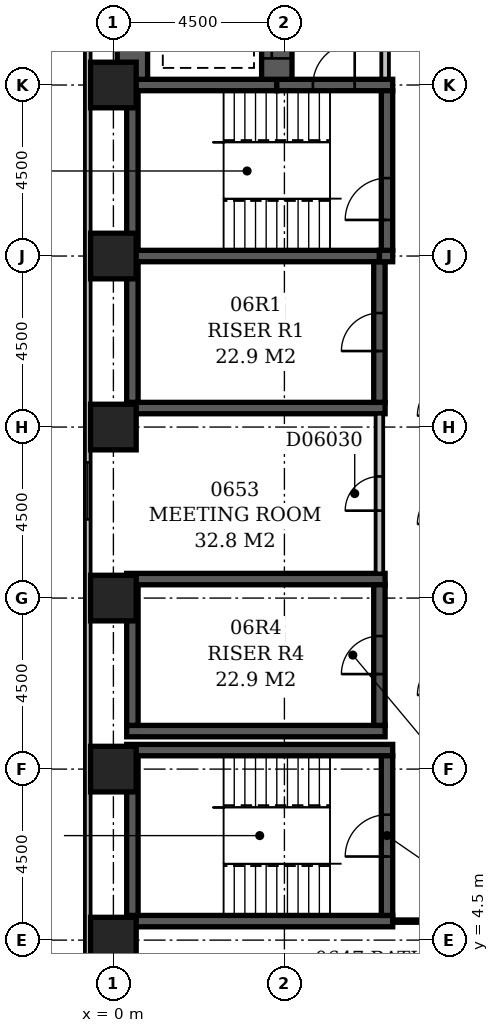
"""IFC4 building model, lengths in metres.
Left out: names, types, materials, properties, quantities, classifications, styles, units other than length and angle.
Written with IfcOpenShell. Run it as: python <this file> out.ifc"""

import sys

from ifc_helpers import new_model, si_unit, direction, frame, frame_2d, origin, origin_2d, place, context, subcontext, project, spatial, rectangle, extrude, element, fill, save


model = new_model("IFC4")
c1 = context("Model", 3, precision=1e-05, world=origin(), true_north=direction((0.0, 1.0)))
c2 = subcontext(c1, "Body", "Model", "MODEL_VIEW")
j1 = project(units=[si_unit("LENGTHUNIT", "METRE"), si_unit("PLANEANGLEUNIT", "RADIAN")], contexts=[c1])
p1 = place(None, origin())
s1 = spatial("IfcSite", under=j1, at=p1, CompositionType="ELEMENT")
p2 = place(p1, origin())
s2 = spatial("IfcBuilding", under=s1, at=p2, CompositionType="ELEMENT")
p3 = place(p2, frame((0.0, 0.0, 32.6)))
s3 = spatial("IfcBuildingStorey", under=s2, at=p3, CompositionType="ELEMENT", Elevation=32.6)
for number, where, z_axis, x_axis in (
    (1, (0.35, 5.0, -0.3), (0.0, 0.0, 1.0), (1.0, 0.0, 0.0)),
    (2, (0.35, 9.5, -0.3), (0.0, 0.0, 1.0), (1.0, 0.0, 0.0)),
):
    element("IfcWall", number, at=place(p3, frame(where, z_axis=z_axis, x_axis=x_axis)), inside=s3, PredefinedType="SHEAR", context=c2, shape_type="SweptSolid", body=[
        extrude(rectangle(XDim=7.0, YDim=0.3, at=frame_2d((3.5, 0.0))), origin(), (0.0, 0.0, 1.0), 3.6),
    ])
for number, where, z_axis, x_axis in (
    (3, (0.35, 10.0, -0.3), (0.0, 0.0, 1.0), (1.0, 0.0, 0.0)),
    (4, (0.35, 14.0, -0.3), (0.0, 0.0, 1.0), (1.0, 0.0, 0.0)),
    (5, (0.35, 18.5, -0.3), (0.0, 0.0, 1.0), (1.0, 0.0, 0.0)),
):
    element("IfcWall", number, at=place(p3, frame(where, z_axis=z_axis, x_axis=x_axis)), inside=s3, PredefinedType="SHEAR", context=c2, shape_type="SweptSolid", body=[
        extrude(rectangle(XDim=6.8, YDim=0.3, at=frame_2d((3.4, 0.0))), origin(), (0.0, 0.0, 1.0), 3.6),
    ])
p4 = place(p3, frame((0.35, 22.5, -0.3), z_axis=(0.0, 0.0, 1.0), x_axis=(1.0, 0.0, 0.0)))
e6 = element("IfcWall", 6, at=p4, inside=s3, PredefinedType="SHEAR", context=c2, shape_type="SweptSolid", body=[
    extrude(rectangle(XDim=6.65, YDim=0.3, at=frame_2d((3.325, 0.0))), origin(), (0.0, 0.0, 1.0), 3.6),
])
p5 = place(p3, frame((0.35, 27.0, -0.3), z_axis=(0.0, 0.0, 1.0), x_axis=(1.0, 0.0, 0.0)))
e7 = element("IfcWall", 7, at=p5, inside=s3, PredefinedType="SHEAR", context=c2, shape_type="SweptSolid", body=[
    extrude(rectangle(XDim=3.95, YDim=0.3, at=frame_2d((1.975, 0.0))), origin(), (0.0, 0.0, 1.0), 3.6),
])
p6 = place(p3, frame((0.5, 5.15, -0.3), z_axis=(0.0, 0.0, 1.0), x_axis=(0.0, 1.0, 0.0)))
e8 = element("IfcWall", 8, at=p6, inside=s3, PredefinedType="SHEAR", context=c2, shape_type="SweptSolid", body=[
    extrude(rectangle(XDim=4.2, YDim=0.3, at=frame_2d((2.1, 0.0))), origin(), (0.0, 0.0, 1.0), 3.6),
])
for number, where, z_axis, x_axis in (
    (9, (0.5, 10.15, -0.3), (0.0, 0.0, 1.0), (0.0, 1.0, 0.0)),
    (10, (0.5, 18.65, -0.3), (0.0, 0.0, 1.0), (0.0, 1.0, 0.0)),
):
    element("IfcWall", number, at=place(p3, frame(where, z_axis=z_axis, x_axis=x_axis)), inside=s3, PredefinedType="SHEAR", context=c2, shape_type="SweptSolid", body=[
        extrude(rectangle(XDim=3.7, YDim=0.3, at=frame_2d((1.85, 0.0))), origin(), (0.0, 0.0, 1.0), 3.6),
    ])
p7 = place(p3, frame((0.5, 22.65, -0.3), z_axis=(0.0, 0.0, 1.0), x_axis=(0.0, 1.0, 0.0)))
e11 = element("IfcWall", 11, at=p7, inside=s3, PredefinedType="SHEAR", context=c2, shape_type="SweptSolid", body=[
    extrude(rectangle(XDim=4.2, YDim=0.3, at=frame_2d((2.1, 0.0))), origin(), (0.0, 0.0, 1.0), 3.6),
])
p8 = place(p3, frame((0.5, 27.15, -0.3), z_axis=(0.0, 0.0, 1.0), x_axis=(0.0, 1.0, 0.0)))
e12 = element("IfcWall", 12, at=p8, inside=s3, PredefinedType="SHEAR", context=c2, shape_type="SweptSolid", body=[
    extrude(rectangle(XDim=6.95, YDim=0.8, at=frame_2d((3.475, 0.0))), origin(), (0.0, 0.0, 1.0), 3.6),
])
p9 = place(p3, frame((4.3, 27.0, -0.3), z_axis=(0.0, 0.0, 1.0), x_axis=(1.0, 0.0, 0.0)))
e13 = element("IfcWall", 13, at=p9, inside=s3, PredefinedType="SHEAR", context=c2, shape_type="SweptSolid", body=[
    extrude(rectangle(XDim=3.05, YDim=0.3, at=frame_2d((1.525, 0.0))), origin(), (0.0, 0.0, 1.0), 3.6),
])
p10 = place(p9, frame((0.95, 0.0, 0.3)))
e14 = element("IfcOpeningElement", 14, at=p10, cuts=e13, PredefinedType="OPENING", context=c2, shape_type="SweptSolid", body=[
    extrude(rectangle(XDim=1.1, YDim=2.1, at=frame_2d((0.55, 1.05))), frame((0.0, 0.162, 0.0), z_axis=(0.0, -1.0, 0.0), x_axis=(1.0, 0.0, 0.0)), (0.0, 0.0, 1.0), 0.324),
])
p11 = place(p3, frame((4.3, 27.15, -0.3), z_axis=(0.0, 0.0, 1.0), x_axis=(0.0, 1.0, 0.0)))
e15 = element("IfcWall", 15, at=p11, inside=s3, PredefinedType="SHEAR", context=c2, shape_type="SweptSolid", body=[
    extrude(rectangle(XDim=6.95, YDim=0.8, at=frame_2d((3.475, 0.0))), origin(), (0.0, 0.0, 1.0), 3.6),
])
p12 = place(p11, frame((3.05, 0.0, 0.3)))
e16 = element("IfcOpeningElement", 16, at=p12, cuts=e15, PredefinedType="OPENING", context=c2, shape_type="SweptSolid", body=[
    extrude(rectangle(XDim=1.1, YDim=2.1, at=frame_2d((0.55, 1.05))), frame((0.0, 0.412, 0.0), z_axis=(0.0, -1.0, 0.0), x_axis=(1.0, 0.0, 0.0)), (0.0, 0.0, 1.0), 0.824),
])
p13 = place(p11, frame((0.55, 0.0, 0.3)))
e17 = element("IfcOpeningElement", 17, at=p13, cuts=e15, PredefinedType="OPENING", context=c2, shape_type="SweptSolid", body=[
    extrude(rectangle(XDim=1.1, YDim=2.1, at=frame_2d((0.55, 1.05))), frame((0.0, 0.412, 0.0), z_axis=(0.0, -1.0, 0.0), x_axis=(1.0, 0.0, 0.0)), (0.0, 0.0, 1.0), 0.824),
])
p14 = place(p11, frame((5.35, 0.0, 0.3)))
e18 = element("IfcOpeningElement", 18, at=p14, cuts=e15, PredefinedType="OPENING", context=c2, shape_type="SweptSolid", body=[
    extrude(rectangle(XDim=1.1, YDim=2.1, at=frame_2d((0.55, 1.05))), frame((0.0, 0.412, 0.0), z_axis=(0.0, -1.0, 0.0), x_axis=(1.0, 0.0, 0.0)), (0.0, 0.0, 1.0), 0.824),
])
p15 = place(p3, frame((7.0, 10.15, -0.3), z_axis=(0.0, 0.0, 1.0), x_axis=(0.0, 1.0, 0.0)))
e19 = element("IfcWall", 19, at=p15, inside=s3, PredefinedType="SHEAR", context=c2, shape_type="SweptSolid", body=[
    extrude(rectangle(XDim=3.7, YDim=0.3, at=frame_2d((1.85, 0.0))), origin(), (0.0, 0.0, 1.0), 3.6),
])
p16 = place(p15, frame((1.35, 0.0, 0.3)))
e20 = element("IfcOpeningElement", 20, at=p16, cuts=e19, PredefinedType="OPENING", context=c2, shape_type="SweptSolid", body=[
    extrude(rectangle(XDim=1.0, YDim=2.1, at=frame_2d((0.5, 1.05))), frame((0.0, 0.162, 0.0), z_axis=(0.0, -1.0, 0.0), x_axis=(1.0, 0.0, 0.0)), (0.0, 0.0, 1.0), 0.324),
])
p17 = place(p3, frame((7.0, 18.65, -0.3), z_axis=(0.0, 0.0, 1.0), x_axis=(0.0, 1.0, 0.0)))
e21 = element("IfcWall", 21, at=p17, inside=s3, PredefinedType="SHEAR", context=c2, shape_type="SweptSolid", body=[
    extrude(rectangle(XDim=3.7, YDim=0.3, at=frame_2d((1.85, 0.0))), origin(), (0.0, 0.0, 1.0), 3.6),
])
p18 = place(p17, frame((1.35, 0.0, 0.3)))
e22 = element("IfcOpeningElement", 22, at=p18, cuts=e21, PredefinedType="OPENING", context=c2, shape_type="SweptSolid", body=[
    extrude(rectangle(XDim=1.0, YDim=2.1, at=frame_2d((0.5, 1.05))), frame((0.0, 0.162, 0.0), z_axis=(0.0, -1.0, 0.0), x_axis=(1.0, 0.0, 0.0)), (0.0, 0.0, 1.0), 0.324),
])
p19 = place(p3, frame((7.0, 22.5, -0.3), z_axis=(0.0, 0.0, 1.0), x_axis=(1.0, 0.0, 0.0)))
e23 = element("IfcWall", 23, at=p19, inside=s3, PredefinedType="SHEAR", context=c2, shape_type="SweptSolid", body=[
    extrude(rectangle(XDim=0.35, YDim=0.3, at=frame_2d((0.175, 0.0))), origin(), (0.0, 0.0, 1.0), 3.6),
])
p20 = place(p3, frame((7.2, 5.15, -0.3), z_axis=(0.0, 0.0, 1.0), x_axis=(0.0, 1.0, 0.0)))
e24 = element("IfcWall", 24, at=p20, inside=s3, PredefinedType="SHEAR", context=c2, shape_type="SweptSolid", body=[
    extrude(rectangle(XDim=4.2, YDim=0.3, at=frame_2d((2.1, 0.0))), origin(), (0.0, 0.0, 1.0), 3.6),
])
p21 = place(p20, frame((1.55, 0.0, 0.3)))
e25 = element("IfcOpeningElement", 25, at=p21, cuts=e24, PredefinedType="OPENING", context=c2, shape_type="SweptSolid", body=[
    extrude(rectangle(XDim=1.1, YDim=2.1, at=frame_2d((0.55, 1.05))), frame((0.0, 0.162, 0.0), z_axis=(0.0, -1.0, 0.0), x_axis=(1.0, 0.0, 0.0)), (0.0, 0.0, 1.0), 0.324),
])
p22 = place(p3, frame((7.2, 22.65, -0.3), z_axis=(0.0, 0.0, 1.0), x_axis=(0.0, 1.0, 0.0)))
e26 = element("IfcWall", 26, at=p22, inside=s3, PredefinedType="SHEAR", context=c2, shape_type="SweptSolid", body=[
    extrude(rectangle(XDim=4.2, YDim=0.3, at=frame_2d((2.1, 0.0))), origin(), (0.0, 0.0, 1.0), 3.6),
])
p23 = place(p22, frame((0.8, 0.0, 0.3)))
e27 = element("IfcOpeningElement", 27, at=p23, cuts=e26, PredefinedType="OPENING", context=c2, shape_type="SweptSolid", body=[
    extrude(rectangle(XDim=1.1, YDim=2.1, at=frame_2d((0.55, 1.05))), frame((0.0, 0.162, 0.0), z_axis=(0.0, -1.0, 0.0), x_axis=(1.0, 0.0, 0.0)), (0.0, 0.0, 1.0), 0.324),
])
for number, where, z_axis, x_axis in (
    (28, (0.0, 4.5, -0.3), (0.0, 0.0, 1.0), (1.0, 0.0, 0.0)),
    (29, (0.0, 9.0, -0.3), (0.0, 0.0, 1.0), (1.0, 0.0, 0.0)),
    (30, (0.0, 13.5, -0.3), (0.0, 0.0, 1.0), (1.0, 0.0, 0.0)),
    (31, (0.0, 18.0, -0.3), (0.0, 0.0, 1.0), (1.0, 0.0, 0.0)),
    (32, (0.0, 22.5, -0.3), (0.0, 0.0, 1.0), (1.0, 0.0, 0.0)),
    (33, (0.0, 27.0, -0.3), (0.0, 0.0, 1.0), (1.0, 0.0, 0.0)),
):
    element("IfcColumn", number, at=place(p3, frame(where, z_axis=z_axis, x_axis=x_axis)), inside=s3, PredefinedType="COLUMN", context=c2, shape_type="SweptSolid", body=[
        extrude(rectangle(XDim=1.2, YDim=1.2, at=origin_2d()), origin(), (0.0, 0.0, 1.0), 3.6),
    ])
p24 = place(p3, frame((-0.675, 59.1, 0.0), z_axis=(0.0, 0.0, 1.0), x_axis=(0.0, -1.0, 0.0)))
e34 = element("IfcWall", 34, at=p24, inside=s3, PredefinedType="STANDARD", context=c2, shape_type="SweptSolid", body=[
    extrude(rectangle(XDim=55.35, YDim=0.15, at=frame_2d((27.675, 0.0))), origin(), (0.0, 0.0, 1.0), 2.7),
])
p25 = place(p24, frame((11.67, 0.0, 0.6)))
e35 = element("IfcOpeningElement", 35, at=p25, cuts=e34, PredefinedType="OPENING", context=c2, shape_type="SweptSolid", body=[
    extrude(rectangle(XDim=1.5, YDim=1.8, at=frame_2d((0.75, 0.9))), frame((0.0, 0.087, 0.0), z_axis=(0.0, -1.0, 0.0), x_axis=(1.0, 0.0, 0.0)), (0.0, 0.0, 1.0), 0.174),
])
p26 = place(p24, frame((15.03, 0.0, 0.6)))
e36 = element("IfcOpeningElement", 36, at=p26, cuts=e34, PredefinedType="OPENING", context=c2, shape_type="SweptSolid", body=[
    extrude(rectangle(XDim=1.5, YDim=1.8, at=frame_2d((0.75, 0.9))), frame((0.0, 0.087, 0.0), z_axis=(0.0, -1.0, 0.0), x_axis=(1.0, 0.0, 0.0)), (0.0, 0.0, 1.0), 0.174),
])
p27 = place(p24, frame((19.65, 0.0, 0.6)))
e37 = element("IfcOpeningElement", 37, at=p27, cuts=e34, PredefinedType="OPENING", context=c2, shape_type="SweptSolid", body=[
    extrude(rectangle(XDim=2.4, YDim=1.8, at=frame_2d((1.2, 0.9))), frame((0.0, 0.087, 0.0), z_axis=(0.0, -1.0, 0.0), x_axis=(1.0, 0.0, 0.0)), (0.0, 0.0, 1.0), 0.174),
])
p28 = place(p24, frame((42.03, 0.0, 0.6)))
e38 = element("IfcOpeningElement", 38, at=p28, cuts=e34, PredefinedType="OPENING", context=c2, shape_type="SweptSolid", body=[
    extrude(rectangle(XDim=1.5, YDim=1.8, at=frame_2d((0.75, 0.9))), frame((0.0, 0.087, 0.0), z_axis=(0.0, -1.0, 0.0), x_axis=(1.0, 0.0, 0.0)), (0.0, 0.0, 1.0), 0.174),
])
p29 = place(p3, frame((7.15, 27.17, 0.0), z_axis=(0.0, 0.0, 1.0), x_axis=(0.0, 1.0, 0.0)))
e39 = element("IfcWall", 39, at=p29, inside=s3, PredefinedType="PARTITIONING", context=c2, shape_type="SweptSolid", body=[
    extrude(rectangle(XDim=4.83, YDim=0.2, at=frame_2d((2.415, 0.0))), origin(), (0.0, 0.0, 1.0), 3.3),
])
p30 = place(p29, frame((1.73, 0.0, 0.0)))
e40 = element("IfcOpeningElement", 40, at=p30, cuts=e39, PredefinedType="OPENING", context=c2, shape_type="SweptSolid", body=[
    extrude(rectangle(XDim=1.2, YDim=2.1, at=frame_2d((0.6, 1.05))), frame((0.0, 0.112, 0.0), z_axis=(0.0, -1.0, 0.0), x_axis=(1.0, 0.0, 0.0)), (0.0, 0.0, 1.0), 0.224),
])
p31 = place(p3, frame((0.0, 4.4, 0.0), z_axis=(0.0, 0.0, 1.0), x_axis=(0.0, 1.0, 0.0)))
e41 = element("IfcWall", 41, at=p31, inside=s3, PredefinedType="PARTITIONING", context=c2, shape_type="SweptSolid", body=[
    extrude(rectangle(XDim=0.7, YDim=0.1, at=frame_2d((0.35, 0.0))), origin(), (0.0, 0.0, 1.0), 2.7),
])
p32 = place(p3, frame((7.349, 5.0, 0.0), z_axis=(0.0, 0.0, 1.0), x_axis=(1.0, 0.0, 0.0)))
e42 = element("IfcWall", 42, at=p32, inside=s3, PredefinedType="PARTITIONING", context=c2, shape_type="SweptSolid", body=[
    extrude(rectangle(XDim=1.551, YDim=0.1, at=frame_2d((0.775, 0.0))), origin(), (0.0, 0.0, 1.0), 3.3),
])
p33 = place(p3, frame((7.0, 14.15, 0.0), z_axis=(0.0, 0.0, 1.0), x_axis=(0.0, 1.0, 0.0)))
e43 = element("IfcWall", 43, at=p33, inside=s3, PredefinedType="PARTITIONING", context=c2, shape_type="SweptSolid", body=[
    extrude(rectangle(XDim=4.2, YDim=0.2, at=frame_2d((2.1, 0.0))), origin(), (0.0, 0.0, 1.0), 3.3),
])
p34 = place(p33, frame((1.65, 0.0, 0.0)))
e44 = element("IfcOpeningElement", 44, at=p34, cuts=e43, PredefinedType="OPENING", context=c2, shape_type="SweptSolid", body=[
    extrude(rectangle(XDim=0.9, YDim=2.1, at=frame_2d((0.45, 1.05))), frame((0.0, 0.112, 0.0), z_axis=(0.0, -1.0, 0.0), x_axis=(1.0, 0.0, 0.0)), (0.0, 0.0, 1.0), 0.224),
])
p35 = place(p28, origin())
e45 = element("IfcWindow", 45, at=p35, inside=s3, PartitioningType="SINGLE_PANEL", PredefinedType="WINDOW", context=c2, shape_type="SweptSolid", body=[
    extrude(rectangle(XDim=1.5, YDim=1.8, at=frame_2d((0.75, 0.9))), frame((0.0, 0.03, 0.0), z_axis=(0.0, -1.0, 0.0), x_axis=(1.0, 0.0, 0.0)), (0.0, 0.0, 1.0), 0.06),
])
fill(e38, e45)
p36 = place(p13, origin())
e46 = element("IfcDoor", 46, at=p36, inside=s3, OperationType="SLIDING_TO_LEFT", PredefinedType="DOOR", context=c2, shape_type="SweptSolid", body=[
    extrude(rectangle(XDim=1.1, YDim=2.1, at=frame_2d((0.55, 1.05))), frame((0.0, 0.025, 0.0), z_axis=(0.0, -1.0, 0.0), x_axis=(1.0, 0.0, 0.0)), (0.0, 0.0, 1.0), 0.05),
])
fill(e17, e46)
p37 = place(p18, origin())
e47 = element("IfcDoor", 47, at=p37, inside=s3, OperationType="SINGLE_SWING_LEFT", PredefinedType="DOOR", context=c2, shape_type="SweptSolid", body=[
    extrude(rectangle(XDim=1.0, YDim=2.1, at=frame_2d((0.5, 1.05))), frame((0.0, 0.025, 0.0), z_axis=(0.0, -1.0, 0.0), x_axis=(1.0, 0.0, 0.0)), (0.0, 0.0, 1.0), 0.05),
])
fill(e22, e47)
p38 = place(p16, origin())
e48 = element("IfcDoor", 48, at=p38, inside=s3, OperationType="SINGLE_SWING_LEFT", PredefinedType="DOOR", context=c2, shape_type="SweptSolid", body=[
    extrude(rectangle(XDim=1.0, YDim=2.1, at=frame_2d((0.5, 1.05))), frame((0.0, 0.025, 0.0), z_axis=(0.0, -1.0, 0.0), x_axis=(1.0, 0.0, 0.0)), (0.0, 0.0, 1.0), 0.05),
])
fill(e20, e48)
p39 = place(p10, frame((1.1, 0.0, 0.0), z_axis=(0.0, 0.0, 1.0), x_axis=(-1.0, 0.0, 0.0)))
e49 = element("IfcDoor", 49, at=p39, inside=s3, OperationType="SINGLE_SWING_LEFT", PredefinedType="DOOR", context=c2, shape_type="SweptSolid", body=[
    extrude(rectangle(XDim=1.1, YDim=2.1, at=frame_2d((0.55, 1.05))), frame((0.0, 0.025, 0.0), z_axis=(0.0, -1.0, 0.0), x_axis=(1.0, 0.0, 0.0)), (0.0, 0.0, 1.0), 0.05),
])
fill(e14, e49)
p40 = place(p23, origin())
e50 = element("IfcDoor", 50, at=p40, inside=s3, OperationType="SINGLE_SWING_LEFT", PredefinedType="DOOR", context=c2, shape_type="SweptSolid", body=[
    extrude(rectangle(XDim=1.1, YDim=2.1, at=frame_2d((0.55, 1.05))), frame((0.0, 0.025, 0.0), z_axis=(0.0, -1.0, 0.0), x_axis=(1.0, 0.0, 0.0)), (0.0, 0.0, 1.0), 0.05),
])
fill(e27, e50)
p41 = place(p21, origin())
e51 = element("IfcDoor", 51, at=p41, inside=s3, OperationType="SINGLE_SWING_LEFT", PredefinedType="DOOR", context=c2, shape_type="SweptSolid", body=[
    extrude(rectangle(XDim=1.1, YDim=2.1, at=frame_2d((0.55, 1.05))), frame((0.0, 0.025, 0.0), z_axis=(0.0, -1.0, 0.0), x_axis=(1.0, 0.0, 0.0)), (0.0, 0.0, 1.0), 0.05),
])
fill(e25, e51)
p42 = place(p34, origin())
e52 = element("IfcDoor", 52, at=p42, inside=s3, OperationType="SINGLE_SWING_LEFT", PredefinedType="DOOR", context=c2, shape_type="SweptSolid", body=[
    extrude(rectangle(XDim=0.9, YDim=2.1, at=frame_2d((0.45, 1.05))), frame((0.0, 0.025, 0.0), z_axis=(0.0, -1.0, 0.0), x_axis=(1.0, 0.0, 0.0)), (0.0, 0.0, 1.0), 0.05),
])
fill(e44, e52)
save(model, sys.argv[1])
